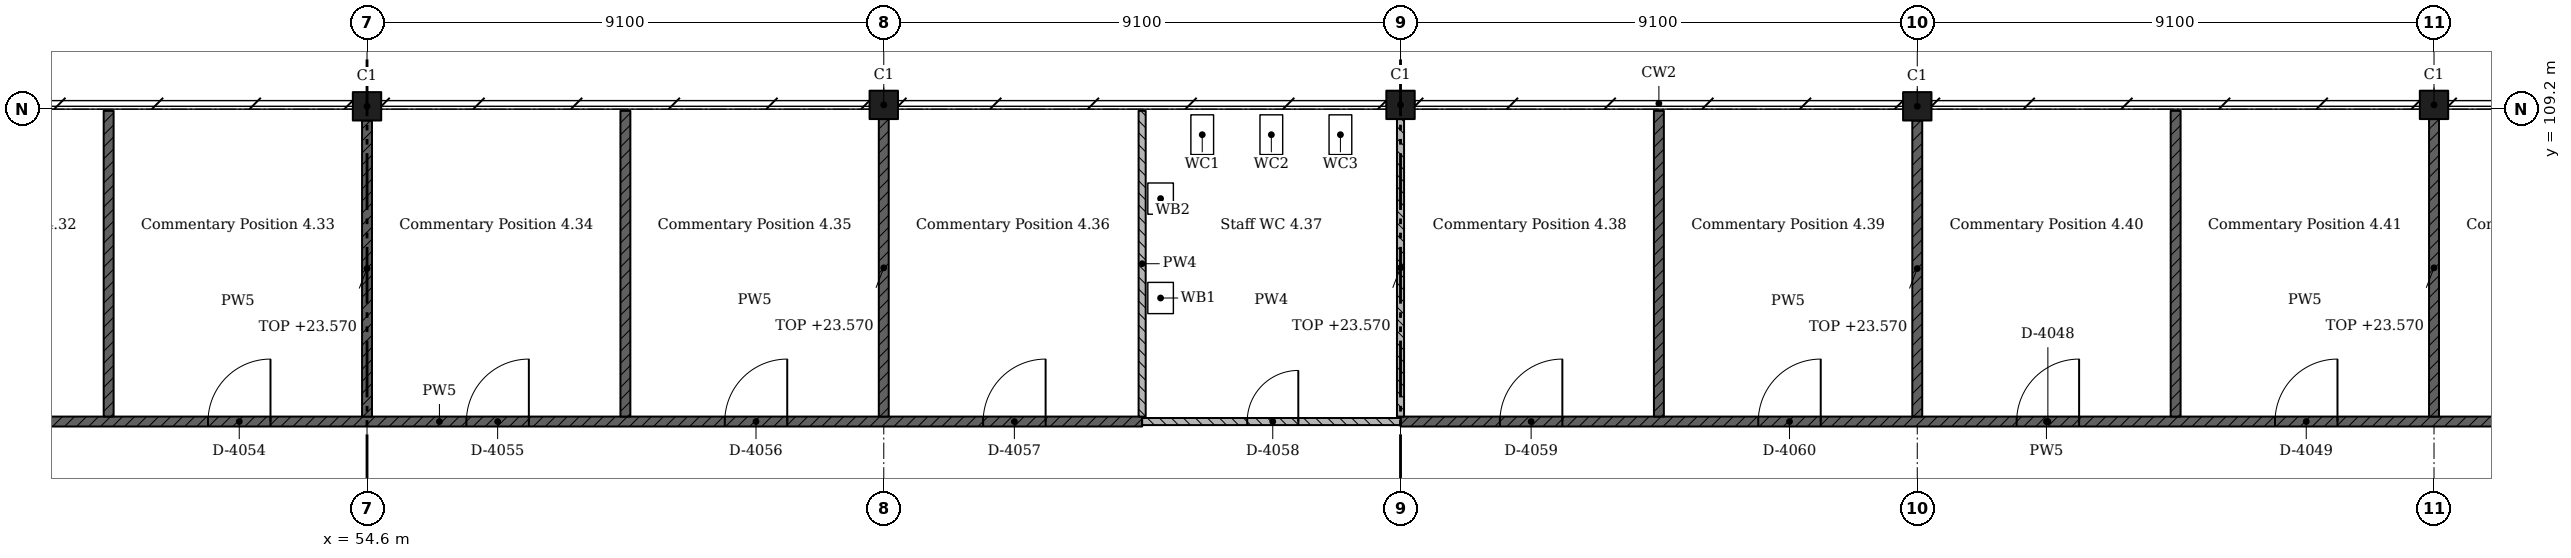
"""IFC4 building model, lengths in metres.
Left out: names, types, materials, properties, quantities, classifications, styles, units other than length and angle.
Written with IfcOpenShell. Run it as: python <this file> out.ifc"""

import sys

from ifc_helpers import new_model, si_unit, direction, frame, frame_2d, origin, origin_2d, place, context, subcontext, project, spatial, rectangle, extrude, element, fill, save


model = new_model("IFC4")
c1 = context("Model", 3, precision=1e-05, world=origin(), true_north=direction((0.0, 1.0)))
c2 = subcontext(c1, "Body", "Model", "MODEL_VIEW")
j1 = project(units=[si_unit("LENGTHUNIT", "METRE"), si_unit("PLANEANGLEUNIT", "RADIAN")], contexts=[c1])
p1 = place(None, origin())
s1 = spatial("IfcSite", under=j1, at=p1, CompositionType="ELEMENT")
p2 = place(p1, origin())
s2 = spatial("IfcBuilding", under=s1, at=p2, CompositionType="ELEMENT")
p3 = place(p2, frame((0.0, 0.0, 20.02)))
s3 = spatial("IfcBuildingStorey", under=s2, at=p3, CompositionType="ELEMENT", Elevation=20.02)
for number, where, z_axis, x_axis in (
    (1, (54.6, 109.25, 0.0), (0.0, 0.0, 1.0), (1.0, 0.0, 0.0)),
    (2, (63.7, 109.275, 0.0), (0.0, 0.0, 1.0), (1.0, 0.0, 0.0)),
    (3, (72.8, 109.275, 0.0), (0.0, 0.0, 1.0), (1.0, 0.0, 0.0)),
    (4, (81.9, 109.25, 0.0), (0.0, 0.0, 1.0), (1.0, 0.0, 0.0)),
    (5, (91.0, 109.275, 0.0), (0.0, 0.0, 1.0), (1.0, 0.0, 0.0)),
):
    element("IfcColumn", number, at=place(p3, frame(where, z_axis=z_axis, x_axis=x_axis)), inside=s3, PredefinedType="COLUMN", context=c2, shape_type="SweptSolid", body=[
        extrude(rectangle(XDim=0.5, YDim=0.5, at=origin_2d()), origin(), (0.0, 0.0, 1.0), 4.55),
    ])
p4 = place(p3, frame((41.05, 103.7, 0.0), z_axis=(0.0, 0.0, 1.0), x_axis=(1.0, 0.0, 0.0)))
e6 = element("IfcWall", 6, at=p4, inside=s3, PredefinedType="PARTITIONING", context=c2, shape_type="SweptSolid", body=[
    extrude(rectangle(XDim=27.2, YDim=0.175, at=frame_2d((13.6, 0.0))), origin(), (0.0, 0.0, 1.0), 4.25),
])
p5 = place(p4, frame((1.65, 0.0, 0.0)))
e7 = element("IfcOpeningElement", 7, at=p5, cuts=e6, PredefinedType="OPENING", context=c2, shape_type="SweptSolid", body=[
    extrude(rectangle(XDim=1.1, YDim=2.4, at=frame_2d((0.55, 1.2))), frame((0.0, 0.097, 0.0), z_axis=(0.0, -1.0, 0.0), x_axis=(1.0, 0.0, 0.0)), (0.0, 0.0, 1.0), 0.195),
])
p6 = place(p4, frame((6.2, 0.0, 0.0)))
e8 = element("IfcOpeningElement", 8, at=p6, cuts=e6, PredefinedType="OPENING", context=c2, shape_type="SweptSolid", body=[
    extrude(rectangle(XDim=1.1, YDim=2.4, at=frame_2d((0.55, 1.2))), frame((0.0, 0.097, 0.0), z_axis=(0.0, -1.0, 0.0), x_axis=(1.0, 0.0, 0.0)), (0.0, 0.0, 1.0), 0.195),
])
p7 = place(p4, frame((10.75, 0.0, 0.0)))
e9 = element("IfcOpeningElement", 9, at=p7, cuts=e6, PredefinedType="OPENING", context=c2, shape_type="SweptSolid", body=[
    extrude(rectangle(XDim=1.1, YDim=2.4, at=frame_2d((0.55, 1.2))), frame((0.0, 0.097, 0.0), z_axis=(0.0, -1.0, 0.0), x_axis=(1.0, 0.0, 0.0)), (0.0, 0.0, 1.0), 0.195),
])
p8 = place(p4, frame((15.3, 0.0, 0.0)))
e10 = element("IfcOpeningElement", 10, at=p8, cuts=e6, PredefinedType="OPENING", context=c2, shape_type="SweptSolid", body=[
    extrude(rectangle(XDim=1.1, YDim=2.4, at=frame_2d((0.55, 1.2))), frame((0.0, 0.097, 0.0), z_axis=(0.0, -1.0, 0.0), x_axis=(1.0, 0.0, 0.0)), (0.0, 0.0, 1.0), 0.195),
])
p9 = place(p4, frame((19.85, 0.0, 0.0)))
e11 = element("IfcOpeningElement", 11, at=p9, cuts=e6, PredefinedType="OPENING", context=c2, shape_type="SweptSolid", body=[
    extrude(rectangle(XDim=1.1, YDim=2.4, at=frame_2d((0.55, 1.2))), frame((0.0, 0.097, 0.0), z_axis=(0.0, -1.0, 0.0), x_axis=(1.0, 0.0, 0.0)), (0.0, 0.0, 1.0), 0.195),
])
p10 = place(p4, frame((24.4, 0.0, 0.0)))
e12 = element("IfcOpeningElement", 12, at=p10, cuts=e6, PredefinedType="OPENING", context=c2, shape_type="SweptSolid", body=[
    extrude(rectangle(XDim=1.1, YDim=2.4, at=frame_2d((0.55, 1.2))), frame((0.0, 0.097, 0.0), z_axis=(0.0, -1.0, 0.0), x_axis=(1.0, 0.0, 0.0)), (0.0, 0.0, 1.0), 0.195),
])
p11 = place(p3, frame((50.05, 109.17, 0.0), z_axis=(0.0, 0.0, 1.0), x_axis=(0.0, -1.0, 0.0)))
e13 = element("IfcWall", 13, at=p11, inside=s3, PredefinedType="PARTITIONING", context=c2, shape_type="SweptSolid", body=[
    extrude(rectangle(XDim=5.382, YDim=0.175, at=frame_2d((2.691, 0.0))), origin(), (0.0, 0.0, 1.0), 4.25),
])
p12 = place(p3, frame((54.6, 109.0, 0.0), z_axis=(0.0, 0.0, 1.0), x_axis=(0.0, -1.0, 0.0)))
e14 = element("IfcWall", 14, at=p12, inside=s3, PredefinedType="PARTITIONING", context=c2, shape_type="SweptSolid", body=[
    extrude(rectangle(XDim=5.212, YDim=0.175, at=frame_2d((2.606, 0.0))), origin(), (0.0, 0.0, 1.0), 3.55),
])
p13 = place(p3, frame((59.15, 109.17, 0.0), z_axis=(0.0, 0.0, 1.0), x_axis=(0.0, -1.0, 0.0)))
e15 = element("IfcWall", 15, at=p13, inside=s3, PredefinedType="PARTITIONING", context=c2, shape_type="SweptSolid", body=[
    extrude(rectangle(XDim=5.382, YDim=0.175, at=frame_2d((2.691, 0.0))), origin(), (0.0, 0.0, 1.0), 4.25),
])
p14 = place(p3, frame((63.7, 109.025, 0.0), z_axis=(0.0, 0.0, 1.0), x_axis=(0.0, -1.0, 0.0)))
e16 = element("IfcWall", 16, at=p14, inside=s3, PredefinedType="PARTITIONING", context=c2, shape_type="SweptSolid", body=[
    extrude(rectangle(XDim=5.237, YDim=0.175, at=frame_2d((2.619, 0.0))), origin(), (0.0, 0.0, 1.0), 3.55),
])
p15 = place(p3, frame((68.25, 103.7, 0.0), z_axis=(0.0, 0.0, 1.0), x_axis=(1.0, 0.0, 0.0)))
e17 = element("IfcWall", 17, at=p15, inside=s3, PredefinedType="PARTITIONING", context=c2, shape_type="SweptSolid", body=[
    extrude(rectangle(XDim=4.55, YDim=0.125, at=frame_2d((2.275, 0.0))), origin(), (0.0, 0.0, 1.0), 4.25),
])
p16 = place(p15, frame((1.85, 0.0, 0.0)))
e18 = element("IfcOpeningElement", 18, at=p16, cuts=e17, PredefinedType="OPENING", context=c2, shape_type="SweptSolid", body=[
    extrude(rectangle(XDim=0.9, YDim=2.1, at=frame_2d((0.45, 1.05))), frame((0.0, 0.073, 0.0), z_axis=(0.0, -1.0, 0.0), x_axis=(1.0, 0.0, 0.0)), (0.0, 0.0, 1.0), 0.145),
])
p17 = place(p3, frame((68.25, 109.17, 0.0), z_axis=(0.0, 0.0, 1.0), x_axis=(0.0, -1.0, 0.0)))
e19 = element("IfcWall", 19, at=p17, inside=s3, PredefinedType="PARTITIONING", context=c2, shape_type="SweptSolid", body=[
    extrude(rectangle(XDim=5.382, YDim=0.125, at=frame_2d((2.691, 0.0))), origin(), (0.0, 0.0, 1.0), 4.25),
])
p18 = place(p3, frame((72.8, 103.7, 0.0), z_axis=(0.0, 0.0, 1.0), x_axis=(1.0, 0.0, 0.0)))
e20 = element("IfcWall", 20, at=p18, inside=s3, PredefinedType="PARTITIONING", context=c2, shape_type="SweptSolid", body=[
    extrude(rectangle(XDim=22.75, YDim=0.175, at=frame_2d((11.375, 0.0))), origin(), (0.0, 0.0, 1.0), 4.25),
])
p19 = place(p18, frame((10.85, 0.0, 0.0)))
e21 = element("IfcOpeningElement", 21, at=p19, cuts=e20, PredefinedType="OPENING", context=c2, shape_type="SweptSolid", body=[
    extrude(rectangle(XDim=1.1, YDim=2.4, at=frame_2d((0.55, 1.2))), frame((0.0, 0.097, 0.0), z_axis=(0.0, -1.0, 0.0), x_axis=(1.0, 0.0, 0.0)), (0.0, 0.0, 1.0), 0.195),
])
p20 = place(p18, frame((15.4, 0.0, 0.0)))
e22 = element("IfcOpeningElement", 22, at=p20, cuts=e20, PredefinedType="OPENING", context=c2, shape_type="SweptSolid", body=[
    extrude(rectangle(XDim=1.1, YDim=2.4, at=frame_2d((0.55, 1.2))), frame((0.0, 0.097, 0.0), z_axis=(0.0, -1.0, 0.0), x_axis=(1.0, 0.0, 0.0)), (0.0, 0.0, 1.0), 0.195),
])
p21 = place(p18, frame((19.95, 0.0, 0.0)))
e23 = element("IfcOpeningElement", 23, at=p21, cuts=e20, PredefinedType="OPENING", context=c2, shape_type="SweptSolid", body=[
    extrude(rectangle(XDim=1.1, YDim=2.4, at=frame_2d((0.55, 1.2))), frame((0.0, 0.097, 0.0), z_axis=(0.0, -1.0, 0.0), x_axis=(1.0, 0.0, 0.0)), (0.0, 0.0, 1.0), 0.195),
])
p22 = place(p18, frame((1.75, 0.0, 0.0)))
e24 = element("IfcOpeningElement", 24, at=p22, cuts=e20, PredefinedType="OPENING", context=c2, shape_type="SweptSolid", body=[
    extrude(rectangle(XDim=1.1, YDim=2.4, at=frame_2d((0.55, 1.2))), frame((0.0, 0.097, 0.0), z_axis=(0.0, -1.0, 0.0), x_axis=(1.0, 0.0, 0.0)), (0.0, 0.0, 1.0), 0.195),
])
p23 = place(p18, frame((6.3, 0.0, 0.0)))
e25 = element("IfcOpeningElement", 25, at=p23, cuts=e20, PredefinedType="OPENING", context=c2, shape_type="SweptSolid", body=[
    extrude(rectangle(XDim=1.1, YDim=2.4, at=frame_2d((0.55, 1.2))), frame((0.0, 0.097, 0.0), z_axis=(0.0, -1.0, 0.0), x_axis=(1.0, 0.0, 0.0)), (0.0, 0.0, 1.0), 0.195),
])
p24 = place(p3, frame((72.8, 109.025, 0.0), z_axis=(0.0, 0.0, 1.0), x_axis=(0.0, -1.0, 0.0)))
e26 = element("IfcWall", 26, at=p24, inside=s3, PredefinedType="PARTITIONING", context=c2, shape_type="SweptSolid", body=[
    extrude(rectangle(XDim=5.237, YDim=0.125, at=frame_2d((2.619, 0.0))), origin(), (0.0, 0.0, 1.0), 3.55),
])
p25 = place(p3, frame((77.35, 109.17, 0.0), z_axis=(0.0, 0.0, 1.0), x_axis=(0.0, -1.0, 0.0)))
e27 = element("IfcWall", 27, at=p25, inside=s3, PredefinedType="PARTITIONING", context=c2, shape_type="SweptSolid", body=[
    extrude(rectangle(XDim=5.382, YDim=0.175, at=frame_2d((2.691, 0.0))), origin(), (0.0, 0.0, 1.0), 4.25),
])
p26 = place(p3, frame((81.9, 109.0, 0.0), z_axis=(0.0, 0.0, 1.0), x_axis=(0.0, -1.0, 0.0)))
e28 = element("IfcWall", 28, at=p26, inside=s3, PredefinedType="PARTITIONING", context=c2, shape_type="SweptSolid", body=[
    extrude(rectangle(XDim=5.212, YDim=0.175, at=frame_2d((2.606, 0.0))), origin(), (0.0, 0.0, 1.0), 3.55),
])
p27 = place(p3, frame((86.45, 109.17, 0.0), z_axis=(0.0, 0.0, 1.0), x_axis=(0.0, -1.0, 0.0)))
e29 = element("IfcWall", 29, at=p27, inside=s3, PredefinedType="PARTITIONING", context=c2, shape_type="SweptSolid", body=[
    extrude(rectangle(XDim=5.382, YDim=0.175, at=frame_2d((2.691, 0.0))), origin(), (0.0, 0.0, 1.0), 4.25),
])
p28 = place(p3, frame((91.0, 109.025, 0.0), z_axis=(0.0, 0.0, 1.0), x_axis=(0.0, -1.0, 0.0)))
e30 = element("IfcWall", 30, at=p28, inside=s3, PredefinedType="PARTITIONING", context=c2, shape_type="SweptSolid", body=[
    extrude(rectangle(XDim=5.237, YDim=0.175, at=frame_2d((2.619, 0.0))), origin(), (0.0, 0.0, 1.0), 3.55),
])
p29 = place(p19, origin())
e31 = element("IfcDoor", 31, at=p29, inside=s3, OperationType="SINGLE_SWING_LEFT", PredefinedType="DOOR", context=c2, shape_type="SweptSolid", body=[
    extrude(rectangle(XDim=1.1, YDim=2.4, at=frame_2d((0.55, 1.2))), frame((0.0, 0.025, 0.0), z_axis=(0.0, -1.0, 0.0), x_axis=(1.0, 0.0, 0.0)), (0.0, 0.0, 1.0), 0.05),
])
fill(e21, e31)
p30 = place(p20, origin())
e32 = element("IfcDoor", 32, at=p30, inside=s3, OperationType="SINGLE_SWING_LEFT", PredefinedType="DOOR", context=c2, shape_type="SweptSolid", body=[
    extrude(rectangle(XDim=1.1, YDim=2.4, at=frame_2d((0.55, 1.2))), frame((0.0, 0.025, 0.0), z_axis=(0.0, -1.0, 0.0), x_axis=(1.0, 0.0, 0.0)), (0.0, 0.0, 1.0), 0.05),
])
fill(e22, e32)
p31 = place(p7, origin())
e33 = element("IfcDoor", 33, at=p31, inside=s3, OperationType="SINGLE_SWING_LEFT", PredefinedType="DOOR", context=c2, shape_type="SweptSolid", body=[
    extrude(rectangle(XDim=1.1, YDim=2.4, at=frame_2d((0.55, 1.2))), frame((0.0, 0.025, 0.0), z_axis=(0.0, -1.0, 0.0), x_axis=(1.0, 0.0, 0.0)), (0.0, 0.0, 1.0), 0.05),
])
fill(e9, e33)
p32 = place(p8, origin())
e34 = element("IfcDoor", 34, at=p32, inside=s3, OperationType="SINGLE_SWING_LEFT", PredefinedType="DOOR", context=c2, shape_type="SweptSolid", body=[
    extrude(rectangle(XDim=1.1, YDim=2.4, at=frame_2d((0.55, 1.2))), frame((0.0, 0.025, 0.0), z_axis=(0.0, -1.0, 0.0), x_axis=(1.0, 0.0, 0.0)), (0.0, 0.0, 1.0), 0.05),
])
fill(e10, e34)
p33 = place(p9, origin())
e35 = element("IfcDoor", 35, at=p33, inside=s3, OperationType="SINGLE_SWING_LEFT", PredefinedType="DOOR", context=c2, shape_type="SweptSolid", body=[
    extrude(rectangle(XDim=1.1, YDim=2.4, at=frame_2d((0.55, 1.2))), frame((0.0, 0.025, 0.0), z_axis=(0.0, -1.0, 0.0), x_axis=(1.0, 0.0, 0.0)), (0.0, 0.0, 1.0), 0.05),
])
fill(e11, e35)
p34 = place(p10, origin())
e36 = element("IfcDoor", 36, at=p34, inside=s3, OperationType="SINGLE_SWING_LEFT", PredefinedType="DOOR", context=c2, shape_type="SweptSolid", body=[
    extrude(rectangle(XDim=1.1, YDim=2.4, at=frame_2d((0.55, 1.2))), frame((0.0, 0.025, 0.0), z_axis=(0.0, -1.0, 0.0), x_axis=(1.0, 0.0, 0.0)), (0.0, 0.0, 1.0), 0.05),
])
fill(e12, e36)
p35 = place(p16, origin())
e37 = element("IfcDoor", 37, at=p35, inside=s3, OperationType="SINGLE_SWING_LEFT", PredefinedType="DOOR", context=c2, shape_type="SweptSolid", body=[
    extrude(rectangle(XDim=0.9, YDim=2.1, at=frame_2d((0.45, 1.05))), frame((0.0, 0.025, 0.0), z_axis=(0.0, -1.0, 0.0), x_axis=(1.0, 0.0, 0.0)), (0.0, 0.0, 1.0), 0.05),
])
fill(e18, e37)
p36 = place(p22, origin())
e38 = element("IfcDoor", 38, at=p36, inside=s3, OperationType="SINGLE_SWING_LEFT", PredefinedType="DOOR", context=c2, shape_type="SweptSolid", body=[
    extrude(rectangle(XDim=1.1, YDim=2.4, at=frame_2d((0.55, 1.2))), frame((0.0, 0.025, 0.0), z_axis=(0.0, -1.0, 0.0), x_axis=(1.0, 0.0, 0.0)), (0.0, 0.0, 1.0), 0.05),
])
fill(e24, e38)
p37 = place(p23, origin())
e39 = element("IfcDoor", 39, at=p37, inside=s3, OperationType="SINGLE_SWING_LEFT", PredefinedType="DOOR", context=c2, shape_type="SweptSolid", body=[
    extrude(rectangle(XDim=1.1, YDim=2.4, at=frame_2d((0.55, 1.2))), frame((0.0, 0.025, 0.0), z_axis=(0.0, -1.0, 0.0), x_axis=(1.0, 0.0, 0.0)), (0.0, 0.0, 1.0), 0.05),
])
fill(e25, e39)
save(model, sys.argv[1])
